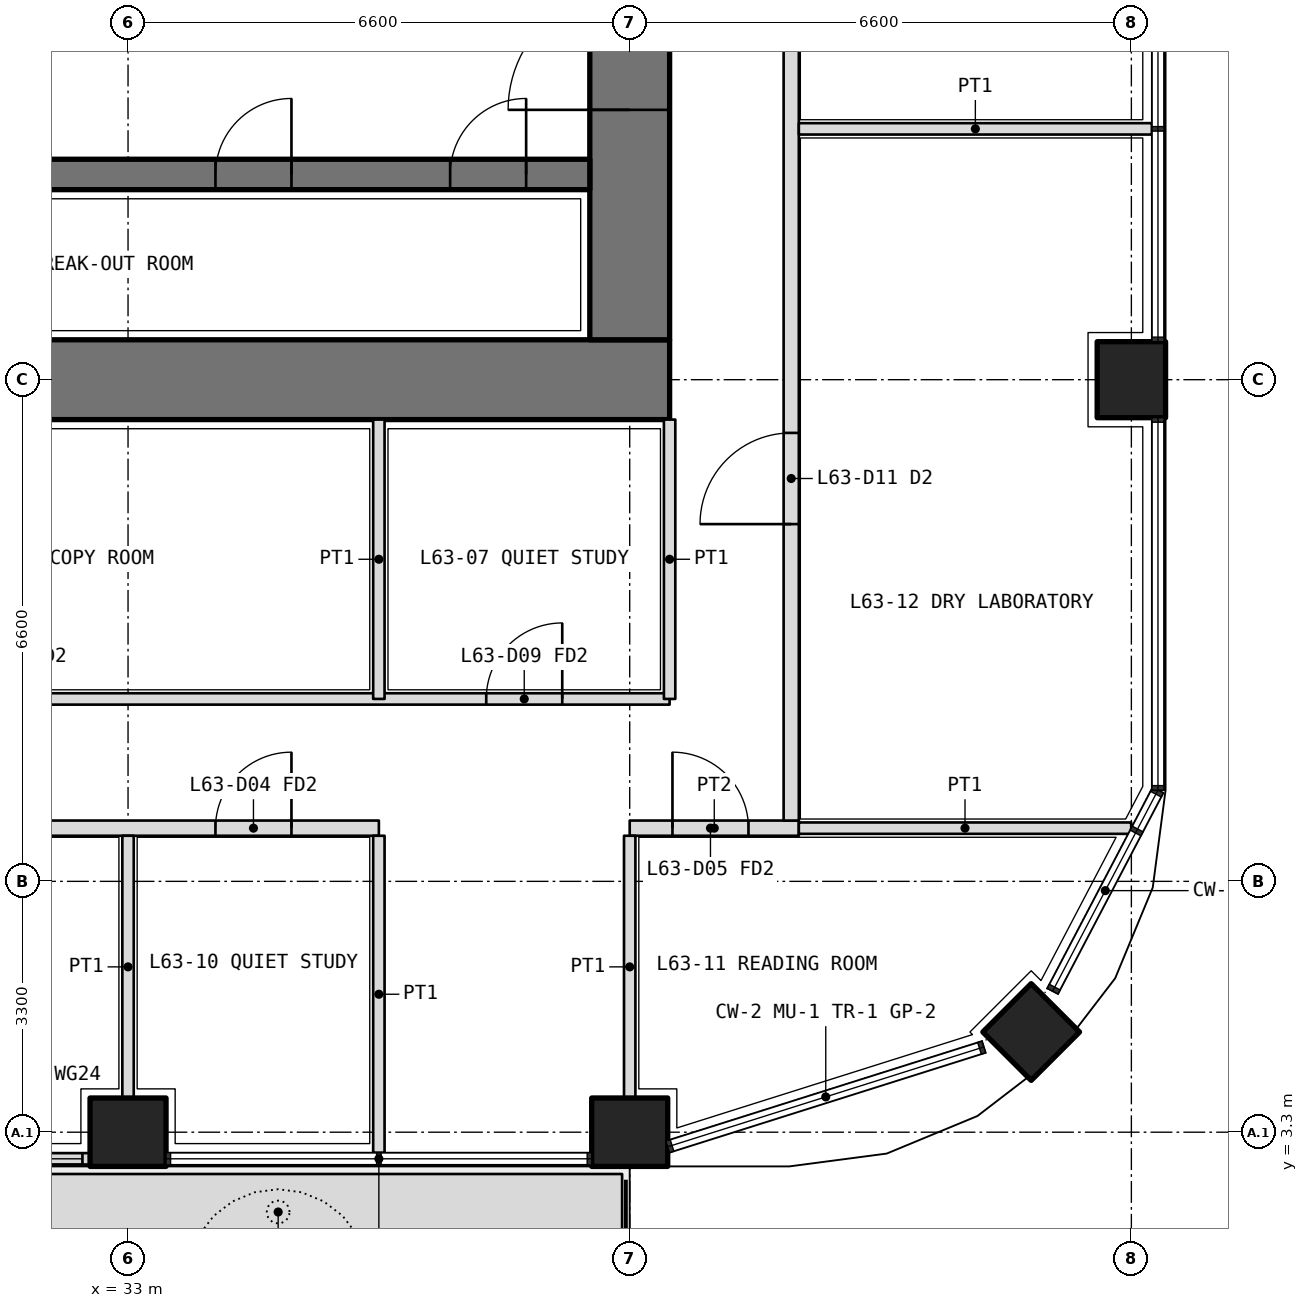
"""IFC4 building model, lengths in metres.
Left out: names, types, materials, properties, quantities, classifications, styles, units other than length and angle.
Written with IfcOpenShell. Run it as: python <this file> out.ifc"""

import sys

from ifc_helpers import new_model, si_unit, direction, frame, frame_2d, origin, origin_2d, place, context, subcontext, project, spatial, polyline, rectangle, outline, extrude, element, fill, save


model = new_model("IFC4")
c1 = context("Model", 3, precision=1e-05, world=origin(), true_north=direction((0.0, 1.0)))
c2 = subcontext(c1, "Body", "Model", "MODEL_VIEW")
j1 = project(units=[si_unit("LENGTHUNIT", "METRE"), si_unit("PLANEANGLEUNIT", "RADIAN")], contexts=[c1])
p1 = place(None, origin())
s1 = spatial("IfcSite", under=j1, at=p1, CompositionType="ELEMENT")
p2 = place(p1, origin())
s2 = spatial("IfcBuilding", under=s1, at=p2, CompositionType="ELEMENT")
p3 = place(p2, frame((0.0, 0.0, 275.4)))
s3 = spatial("IfcBuildingStorey", under=s2, at=p3, CompositionType="ELEMENT", Elevation=275.4)
p4 = place(p3, frame((44.882, 4.618, 0.0), z_axis=(0.0, 0.0, 1.0), x_axis=(0.707106781187, 0.707106781187, 0.0)))
e1 = element("IfcColumn", 1, at=p4, inside=s3, PredefinedType="COLUMN", context=c2, shape_type="SweptSolid", body=[
    extrude(rectangle(XDim=0.9, YDim=0.9, at=origin_2d()), origin(), (0.0, 0.0, 1.0), 4.2),
])
for number, where, z_axis, x_axis in (
    (2, (33.0, 3.3, 0.0), (0.0, 0.0, 1.0), (1.0, 0.0, 0.0)),
    (3, (39.6, 3.3, 0.0), (0.0, 0.0, 1.0), (1.0, 0.0, 0.0)),
    (4, (46.2, 13.2, 0.0), (0.0, 0.0, 1.0), (0.0, 1.0, 0.0)),
):
    element("IfcColumn", number, at=place(p3, frame(where, z_axis=z_axis, x_axis=x_axis)), inside=s3, PredefinedType="COLUMN", context=c2, shape_type="SweptSolid", body=[
        extrude(rectangle(XDim=1.0, YDim=0.9, at=origin_2d()), origin(), (0.0, 0.0, 1.0), 4.2),
    ])
p5 = place(p3, origin())
e5 = element("IfcWall", 5, at=p5, inside=s3, PredefinedType="USERDEFINED", context=c2, shape_type="SweptSolid", body=[
    extrude(outline(polyline([(30.45, 1.75), (39.5, 1.75), (39.5, 2.75), (30.45, 2.75), (30.45, 1.75)]), holes=[polyline([(30.6, 1.9), (39.35, 1.9), (39.35, 2.6), (30.6, 2.6), (30.6, 1.9)])]), origin(), (0.0, 0.0, 1.0), 1.05),
])
p6 = place(p3, frame((26.9, 2.95, 0.0), z_axis=(0.0, 0.0, 1.0), x_axis=(1.0, 0.0, 0.0)))
e6 = element("IfcWall", 6, at=p6, inside=s3, PredefinedType="SOLIDWALL", context=c2, shape_type="SweptSolid", body=[
    extrude(rectangle(XDim=5.6, YDim=0.15, at=frame_2d((2.8, 0.0))), origin(), (0.0, 0.0, 1.0), 2.7),
])
p7 = place(p6, frame((3.05, 0.0, 0.0)))
e7 = element("IfcOpeningElement", 7, at=p7, cuts=e6, PredefinedType="OPENING", context=c2, shape_type="SweptSolid", body=[
    extrude(rectangle(XDim=1.0, YDim=2.4, at=frame_2d((0.5, 1.2))), frame((0.0, 0.085, 0.0), z_axis=(0.0, -1.0, 0.0), x_axis=(1.0, 0.0, 0.0)), (0.0, 0.0, 1.0), 0.17),
])
p8 = place(p6, frame((0.1, 0.0, 0.1)))
e8 = element("IfcOpeningElement", 8, at=p8, cuts=e6, PredefinedType="OPENING", context=c2, shape_type="SweptSolid", body=[
    extrude(rectangle(XDim=2.45, YDim=2.3, at=frame_2d((1.225, 1.15))), frame((0.0, 0.085, 0.0), z_axis=(0.0, -1.0, 0.0), x_axis=(1.0, 0.0, 0.0)), (0.0, 0.0, 1.0), 0.17),
])
p9 = place(p6, frame((4.15, 0.0, 0.1)))
e9 = element("IfcOpeningElement", 9, at=p9, cuts=e6, PredefinedType="OPENING", context=c2, shape_type="SweptSolid", body=[
    extrude(rectangle(XDim=1.35, YDim=2.3, at=frame_2d((0.675, 1.15))), frame((0.0, 0.085, 0.0), z_axis=(0.0, -1.0, 0.0), x_axis=(1.0, 0.0, 0.0)), (0.0, 0.0, 1.0), 0.17),
])
p10 = place(p3, frame((12.675, 13.2, 0.0), z_axis=(0.0, 0.0, 1.0), x_axis=(1.0, 0.0, 0.0)))
e10 = element("IfcWall", 10, at=p10, inside=s3, PredefinedType="SHEAR", context=c2, shape_type="SweptSolid", body=[
    extrude(rectangle(XDim=27.45, YDim=1.05, at=frame_2d((13.725, 0.0))), origin(), (0.0, 0.0, 1.0), 4.2),
])
p11 = place(p3, frame((39.6, 13.725, 0.0), z_axis=(0.0, 0.0, 1.0), x_axis=(0.0, 1.0, 0.0)))
e11 = element("IfcWall", 11, at=p11, inside=s3, PredefinedType="SHEAR", context=c2, shape_type="SweptSolid", body=[
    extrude(rectangle(XDim=18.75, YDim=1.05, at=frame_2d((9.375, 0.0))), origin(), (0.0, 0.0, 1.0), 4.2),
])
p12 = place(p11, frame((3.025, 0.0, 0.0)))
e12 = element("IfcOpeningElement", 12, at=p12, cuts=e11, PredefinedType="OPENING", context=c2, shape_type="SweptSolid", body=[
    extrude(rectangle(XDim=1.6, YDim=2.1, at=frame_2d((0.8, 1.05))), frame((0.0, 0.535, 0.0), z_axis=(0.0, -1.0, 0.0), x_axis=(1.0, 0.0, 0.0)), (0.0, 0.0, 1.0), 1.07),
])
p13 = place(p11, frame((13.825, 0.0, 0.0)))
e13 = element("IfcOpeningElement", 13, at=p13, cuts=e11, PredefinedType="OPENING", context=c2, shape_type="SweptSolid", body=[
    extrude(rectangle(XDim=1.6, YDim=2.1, at=frame_2d((0.8, 1.05))), frame((0.0, 0.535, 0.0), z_axis=(0.0, -1.0, 0.0), x_axis=(1.0, 0.0, 0.0)), (0.0, 0.0, 1.0), 1.07),
])
p14 = place(p3, frame((13.725, 15.9, 0.0), z_axis=(0.0, 0.0, 1.0), x_axis=(1.0, 0.0, 0.0)))
e14 = element("IfcWall", 14, at=p14, inside=s3, PredefinedType="SHEAR", context=c2, shape_type="SweptSolid", body=[
    extrude(rectangle(XDim=25.35, YDim=0.4, at=frame_2d((12.675, 0.0))), origin(), (0.0, 0.0, 1.0), 4.2),
])
p15 = place(p14, frame((0.837, 0.0, 0.0)))
e15 = element("IfcOpeningElement", 15, at=p15, cuts=e14, PredefinedType="OPENING", context=c2, shape_type="SweptSolid", body=[
    extrude(rectangle(XDim=1.0, YDim=2.1, at=frame_2d((0.5, 1.05))), frame((0.0, 0.21, 0.0), z_axis=(0.0, -1.0, 0.0), x_axis=(1.0, 0.0, 0.0)), (0.0, 0.0, 1.0), 0.42),
])
p16 = place(p14, frame((3.925, 0.0, 0.0)))
e16 = element("IfcOpeningElement", 16, at=p16, cuts=e14, PredefinedType="OPENING", context=c2, shape_type="SweptSolid", body=[
    extrude(rectangle(XDim=1.0, YDim=2.1, at=frame_2d((0.5, 1.05))), frame((0.0, 0.21, 0.0), z_axis=(0.0, -1.0, 0.0), x_axis=(1.0, 0.0, 0.0)), (0.0, 0.0, 1.0), 0.42),
])
p17 = place(p14, frame((7.225, 0.0, 0.0)))
e17 = element("IfcOpeningElement", 17, at=p17, cuts=e14, PredefinedType="OPENING", context=c2, shape_type="SweptSolid", body=[
    extrude(rectangle(XDim=1.0, YDim=2.1, at=frame_2d((0.5, 1.05))), frame((0.0, 0.21, 0.0), z_axis=(0.0, -1.0, 0.0), x_axis=(1.0, 0.0, 0.0)), (0.0, 0.0, 1.0), 0.42),
])
p18 = place(p14, frame((10.525, 0.0, 0.0)))
e18 = element("IfcOpeningElement", 18, at=p18, cuts=e14, PredefinedType="OPENING", context=c2, shape_type="SweptSolid", body=[
    extrude(rectangle(XDim=1.0, YDim=2.1, at=frame_2d((0.5, 1.05))), frame((0.0, 0.21, 0.0), z_axis=(0.0, -1.0, 0.0), x_axis=(1.0, 0.0, 0.0)), (0.0, 0.0, 1.0), 0.42),
])
p19 = place(p14, frame((13.825, 0.0, 0.0)))
e19 = element("IfcOpeningElement", 19, at=p19, cuts=e14, PredefinedType="OPENING", context=c2, shape_type="SweptSolid", body=[
    extrude(rectangle(XDim=1.0, YDim=2.1, at=frame_2d((0.5, 1.05))), frame((0.0, 0.21, 0.0), z_axis=(0.0, -1.0, 0.0), x_axis=(1.0, 0.0, 0.0)), (0.0, 0.0, 1.0), 0.42),
])
p20 = place(p14, frame((17.125, 0.0, 0.0)))
e20 = element("IfcOpeningElement", 20, at=p20, cuts=e14, PredefinedType="OPENING", context=c2, shape_type="SweptSolid", body=[
    extrude(rectangle(XDim=1.0, YDim=2.1, at=frame_2d((0.5, 1.05))), frame((0.0, 0.21, 0.0), z_axis=(0.0, -1.0, 0.0), x_axis=(1.0, 0.0, 0.0)), (0.0, 0.0, 1.0), 0.42),
])
p21 = place(p14, frame((20.425, 0.0, 0.0)))
e21 = element("IfcOpeningElement", 21, at=p21, cuts=e14, PredefinedType="OPENING", context=c2, shape_type="SweptSolid", body=[
    extrude(rectangle(XDim=1.0, YDim=2.1, at=frame_2d((0.5, 1.05))), frame((0.0, 0.21, 0.0), z_axis=(0.0, -1.0, 0.0), x_axis=(1.0, 0.0, 0.0)), (0.0, 0.0, 1.0), 0.42),
])
p22 = place(p14, frame((23.512, 0.0, 0.0)))
e22 = element("IfcOpeningElement", 22, at=p22, cuts=e14, PredefinedType="OPENING", context=c2, shape_type="SweptSolid", body=[
    extrude(rectangle(XDim=1.0, YDim=2.1, at=frame_2d((0.5, 1.05))), frame((0.0, 0.21, 0.0), z_axis=(0.0, -1.0, 0.0), x_axis=(1.0, 0.0, 0.0)), (0.0, 0.0, 1.0), 0.42),
])
p23 = place(p3, frame((12.675, 9.0, 0.0), z_axis=(0.0, 0.0, 1.0), x_axis=(1.0, 0.0, 0.0)))
e23 = element("IfcWall", 23, at=p23, inside=s3, PredefinedType="PARTITIONING", context=c2, shape_type="SweptSolid", body=[
    extrude(rectangle(XDim=27.45, YDim=0.15, at=frame_2d((13.725, 0.0))), origin(), (0.0, 0.0, 1.0), 3.0),
])
p24 = place(p23, frame((4.712, 0.0, 0.0)))
e24 = element("IfcOpeningElement", 24, at=p24, cuts=e23, PredefinedType="OPENING", context=c2, shape_type="SweptSolid", body=[
    extrude(rectangle(XDim=1.0, YDim=2.1, at=frame_2d((0.5, 1.05))), frame((0.0, 0.085, 0.0), z_axis=(0.0, -1.0, 0.0), x_axis=(1.0, 0.0, 0.0)), (0.0, 0.0, 1.0), 0.17),
])
p25 = place(p23, frame((11.575, 0.0, 0.0)))
e25 = element("IfcOpeningElement", 25, at=p25, cuts=e23, PredefinedType="OPENING", context=c2, shape_type="SweptSolid", body=[
    extrude(rectangle(XDim=1.0, YDim=2.1, at=frame_2d((0.5, 1.05))), frame((0.0, 0.085, 0.0), z_axis=(0.0, -1.0, 0.0), x_axis=(1.0, 0.0, 0.0)), (0.0, 0.0, 1.0), 0.17),
])
p26 = place(p23, frame((18.175, 0.0, 0.0)))
e26 = element("IfcOpeningElement", 26, at=p26, cuts=e23, PredefinedType="OPENING", context=c2, shape_type="SweptSolid", body=[
    extrude(rectangle(XDim=1.0, YDim=2.1, at=frame_2d((0.5, 1.05))), frame((0.0, 0.085, 0.0), z_axis=(0.0, -1.0, 0.0), x_axis=(1.0, 0.0, 0.0)), (0.0, 0.0, 1.0), 0.17),
])
p27 = place(p23, frame((25.038, 0.0, 0.0)))
e27 = element("IfcOpeningElement", 27, at=p27, cuts=e23, PredefinedType="OPENING", context=c2, shape_type="SweptSolid", body=[
    extrude(rectangle(XDim=1.0, YDim=2.1, at=frame_2d((0.5, 1.05))), frame((0.0, 0.085, 0.0), z_axis=(0.0, -1.0, 0.0), x_axis=(1.0, 0.0, 0.0)), (0.0, 0.0, 1.0), 0.17),
])
p28 = place(p3, frame((40.125, 12.675, 0.0), z_axis=(0.0, 0.0, 1.0), x_axis=(0.0, -1.0, 0.0)))
e28 = element("IfcWall", 28, at=p28, inside=s3, PredefinedType="PARTITIONING", context=c2, shape_type="SweptSolid", body=[
    extrude(rectangle(XDim=3.675, YDim=0.15, at=frame_2d((1.837, 0.0))), origin(), (0.0, 0.0, 1.0), 3.0),
])
p29 = place(p3, frame((36.3, 12.675, 0.0), z_axis=(0.0, 0.0, 1.0), x_axis=(0.0, -1.0, 0.0)))
e29 = element("IfcWall", 29, at=p29, inside=s3, PredefinedType="PARTITIONING", context=c2, shape_type="SweptSolid", body=[
    extrude(rectangle(XDim=3.675, YDim=0.15, at=frame_2d((1.837, 0.0))), origin(), (0.0, 0.0, 1.0), 3.9),
])
p30 = place(p3, frame((10.975, 7.3, 0.0), z_axis=(0.0, 0.0, 1.0), x_axis=(1.0, 0.0, 0.0)))
e30 = element("IfcWall", 30, at=p30, inside=s3, PredefinedType="PARTITIONING", context=c2, shape_type="SweptSolid", body=[
    extrude(rectangle(XDim=25.325, YDim=0.2, at=frame_2d((12.663, 0.0))), origin(), (0.0, 0.0, 1.0), 3.0),
])
p31 = place(p30, frame((0.562, 0.0, 0.0)))
e31 = element("IfcOpeningElement", 31, at=p31, cuts=e30, PredefinedType="OPENING", context=c2, shape_type="SweptSolid", body=[
    extrude(rectangle(XDim=1.2, YDim=2.1, at=frame_2d((0.6, 1.05))), frame((0.0, 0.11, 0.0), z_axis=(0.0, -1.0, 0.0), x_axis=(1.0, 0.0, 0.0)), (0.0, 0.0, 1.0), 0.22),
])
p32 = place(p30, frame((11.625, 0.0, 0.0)))
e32 = element("IfcOpeningElement", 32, at=p32, cuts=e30, PredefinedType="OPENING", context=c2, shape_type="SweptSolid", body=[
    extrude(rectangle(XDim=1.0, YDim=2.1, at=frame_2d((0.5, 1.05))), frame((0.0, 0.11, 0.0), z_axis=(0.0, -1.0, 0.0), x_axis=(1.0, 0.0, 0.0)), (0.0, 0.0, 1.0), 0.22),
])
p33 = place(p30, frame((23.175, 0.0, 0.0)))
e33 = element("IfcOpeningElement", 33, at=p33, cuts=e30, PredefinedType="OPENING", context=c2, shape_type="SweptSolid", body=[
    extrude(rectangle(XDim=1.0, YDim=2.1, at=frame_2d((0.5, 1.05))), frame((0.0, 0.11, 0.0), z_axis=(0.0, -1.0, 0.0), x_axis=(1.0, 0.0, 0.0)), (0.0, 0.0, 1.0), 0.22),
])
p34 = place(p3, frame((39.6, 7.3, 0.0), z_axis=(0.0, 0.0, 1.0), x_axis=(1.0, 0.0, 0.0)))
e34 = element("IfcWall", 34, at=p34, inside=s3, PredefinedType="PARTITIONING", context=c2, shape_type="SweptSolid", body=[
    extrude(rectangle(XDim=2.225, YDim=0.2, at=frame_2d((1.112, 0.0))), origin(), (0.0, 0.0, 1.0), 3.0),
])
p35 = place(p34, frame((0.562, 0.0, 0.0)))
e35 = element("IfcOpeningElement", 35, at=p35, cuts=e34, PredefinedType="OPENING", context=c2, shape_type="SweptSolid", body=[
    extrude(rectangle(XDim=1.0, YDim=2.1, at=frame_2d((0.5, 1.05))), frame((0.0, 0.11, 0.0), z_axis=(0.0, -1.0, 0.0), x_axis=(1.0, 0.0, 0.0)), (0.0, 0.0, 1.0), 0.22),
])
p36 = place(p3, frame((41.725, 7.4, 0.0), z_axis=(0.0, 0.0, 1.0), x_axis=(0.0, 1.0, 0.0)))
e36 = element("IfcWall", 36, at=p36, inside=s3, PredefinedType="PARTITIONING", context=c2, shape_type="SweptSolid", body=[
    extrude(rectangle(XDim=31.4, YDim=0.2, at=frame_2d((15.7, 0.0))), origin(), (0.0, 0.0, 1.0), 3.0),
])
p37 = place(p36, frame((3.9, 0.0, 0.0)))
e37 = element("IfcOpeningElement", 37, at=p37, cuts=e36, PredefinedType="OPENING", context=c2, shape_type="SweptSolid", body=[
    extrude(rectangle(XDim=1.2, YDim=2.1, at=frame_2d((0.6, 1.05))), frame((0.0, 0.11, 0.0), z_axis=(0.0, -1.0, 0.0), x_axis=(1.0, 0.0, 0.0)), (0.0, 0.0, 1.0), 0.22),
])
p38 = place(p36, frame((10.25, 0.0, 0.0)))
e38 = element("IfcOpeningElement", 38, at=p38, cuts=e36, PredefinedType="OPENING", context=c2, shape_type="SweptSolid", body=[
    extrude(rectangle(XDim=1.0, YDim=2.1, at=frame_2d((0.5, 1.05))), frame((0.0, 0.11, 0.0), z_axis=(0.0, -1.0, 0.0), x_axis=(1.0, 0.0, 0.0)), (0.0, 0.0, 1.0), 0.22),
])
p39 = place(p36, frame((13.4, 0.0, 0.0)))
e39 = element("IfcOpeningElement", 39, at=p39, cuts=e36, PredefinedType="OPENING", context=c2, shape_type="SweptSolid", body=[
    extrude(rectangle(XDim=1.0, YDim=2.1, at=frame_2d((0.5, 1.05))), frame((0.0, 0.11, 0.0), z_axis=(0.0, -1.0, 0.0), x_axis=(1.0, 0.0, 0.0)), (0.0, 0.0, 1.0), 0.22),
])
p40 = place(p36, frame((16.75, 0.0, 0.0)))
e40 = element("IfcOpeningElement", 40, at=p40, cuts=e36, PredefinedType="OPENING", context=c2, shape_type="SweptSolid", body=[
    extrude(rectangle(XDim=0.9, YDim=2.1, at=frame_2d((0.45, 1.05))), frame((0.0, 0.11, 0.0), z_axis=(0.0, -1.0, 0.0), x_axis=(1.0, 0.0, 0.0)), (0.0, 0.0, 1.0), 0.22),
])
p41 = place(p36, frame((20.15, 0.0, 0.0)))
e41 = element("IfcOpeningElement", 41, at=p41, cuts=e36, PredefinedType="OPENING", context=c2, shape_type="SweptSolid", body=[
    extrude(rectangle(XDim=1.0, YDim=2.1, at=frame_2d((0.5, 1.05))), frame((0.0, 0.11, 0.0), z_axis=(0.0, -1.0, 0.0), x_axis=(1.0, 0.0, 0.0)), (0.0, 0.0, 1.0), 0.22),
])
p42 = place(p36, frame((23.45, 0.0, 0.0)))
e42 = element("IfcOpeningElement", 42, at=p42, cuts=e36, PredefinedType="OPENING", context=c2, shape_type="SweptSolid", body=[
    extrude(rectangle(XDim=1.0, YDim=2.1, at=frame_2d((0.5, 1.05))), frame((0.0, 0.11, 0.0), z_axis=(0.0, -1.0, 0.0), x_axis=(1.0, 0.0, 0.0)), (0.0, 0.0, 1.0), 0.22),
])
p43 = place(p36, frame((28.05, 0.0, 0.0)))
e43 = element("IfcOpeningElement", 43, at=p43, cuts=e36, PredefinedType="OPENING", context=c2, shape_type="SweptSolid", body=[
    extrude(rectangle(XDim=1.0, YDim=2.1, at=frame_2d((0.5, 1.05))), frame((0.0, 0.11, 0.0), z_axis=(0.0, -1.0, 0.0), x_axis=(1.0, 0.0, 0.0)), (0.0, 0.0, 1.0), 0.22),
])
p44 = place(p3, frame((46.198, 7.3, 0.0), z_axis=(0.0, 0.0, 1.0), x_axis=(-1.0, 0.0, 0.0)))
e44 = element("IfcWall", 44, at=p44, inside=s3, PredefinedType="PARTITIONING", context=c2, shape_type="SweptSolid", body=[
    extrude(rectangle(XDim=4.373, YDim=0.15, at=frame_2d((2.186, 0.0))), origin(), (0.0, 0.0, 1.0), 2.7),
])
p45 = place(p3, frame((33.0, 3.75, 0.0), z_axis=(0.0, 0.0, 1.0), x_axis=(0.0, 1.0, 0.0)))
e45 = element("IfcWall", 45, at=p45, inside=s3, PredefinedType="PARTITIONING", context=c2, shape_type="SweptSolid", body=[
    extrude(rectangle(XDim=3.45, YDim=0.15, at=frame_2d((1.725, 0.0))), origin(), (0.0, 0.0, 1.0), 3.0),
])
p46 = place(p3, frame((36.3, 3.03, 0.0), z_axis=(0.0, 0.0, 1.0), x_axis=(0.0, 1.0, 0.0)))
e46 = element("IfcWall", 46, at=p46, inside=s3, PredefinedType="PARTITIONING", context=c2, shape_type="SweptSolid", body=[
    extrude(rectangle(XDim=4.17, YDim=0.15, at=frame_2d((2.085, 0.0))), origin(), (0.0, 0.0, 1.0), 2.7),
])
p47 = place(p3, frame((39.6, 3.75, 0.0), z_axis=(0.0, 0.0, 1.0), x_axis=(0.0, 1.0, 0.0)))
e47 = element("IfcWall", 47, at=p47, inside=s3, PredefinedType="PARTITIONING", context=c2, shape_type="SweptSolid", body=[
    extrude(rectangle(XDim=3.45, YDim=0.15, at=frame_2d((1.725, 0.0))), origin(), (0.0, 0.0, 1.0), 3.0),
])
p48 = place(p3, frame((46.47, 16.5, 0.0), z_axis=(0.0, 0.0, 1.0), x_axis=(-1.0, 0.0, 0.0)))
e48 = element("IfcWall", 48, at=p48, inside=s3, PredefinedType="PARTITIONING", context=c2, shape_type="SweptSolid", body=[
    extrude(rectangle(XDim=4.645, YDim=0.15, at=frame_2d((2.323, 0.0))), origin(), (0.0, 0.0, 1.0), 2.7),
])
p49 = place(p9, origin())
e49 = element("IfcWindow", 49, at=p49, inside=s3, PartitioningType="SINGLE_PANEL", PredefinedType="WINDOW", context=c2, shape_type="SweptSolid", body=[
    extrude(rectangle(XDim=1.35, YDim=2.3, at=frame_2d((0.675, 1.15))), frame((0.0, 0.03, 0.0), z_axis=(0.0, -1.0, 0.0), x_axis=(1.0, 0.0, 0.0)), (0.0, 0.0, 1.0), 0.06),
])
fill(e9, e49)
p50 = place(p27, origin())
e50 = element("IfcDoor", 50, at=p50, inside=s3, OperationType="SINGLE_SWING_RIGHT", PredefinedType="DOOR", context=c2, shape_type="SweptSolid", body=[
    extrude(rectangle(XDim=1.0, YDim=2.1, at=frame_2d((0.5, 1.05))), frame((0.0, 0.025, 0.0), z_axis=(0.0, -1.0, 0.0), x_axis=(1.0, 0.0, 0.0)), (0.0, 0.0, 1.0), 0.05),
])
fill(e27, e50)
p51 = place(p33, origin())
e51 = element("IfcDoor", 51, at=p51, inside=s3, OperationType="SINGLE_SWING_RIGHT", PredefinedType="DOOR", context=c2, shape_type="SweptSolid", body=[
    extrude(rectangle(XDim=1.0, YDim=2.1, at=frame_2d((0.5, 1.05))), frame((0.0, 0.025, 0.0), z_axis=(0.0, -1.0, 0.0), x_axis=(1.0, 0.0, 0.0)), (0.0, 0.0, 1.0), 0.05),
])
fill(e33, e51)
p52 = place(p35, origin())
e52 = element("IfcDoor", 52, at=p52, inside=s3, OperationType="SINGLE_SWING_LEFT", PredefinedType="DOOR", context=c2, shape_type="SweptSolid", body=[
    extrude(rectangle(XDim=1.0, YDim=2.1, at=frame_2d((0.5, 1.05))), frame((0.0, 0.025, 0.0), z_axis=(0.0, -1.0, 0.0), x_axis=(1.0, 0.0, 0.0)), (0.0, 0.0, 1.0), 0.05),
])
fill(e35, e52)
p53 = place(p37, origin())
e53 = element("IfcDoor", 53, at=p53, inside=s3, OperationType="DOUBLE_DOOR_SINGLE_SWING", PredefinedType="DOOR", context=c2, shape_type="SweptSolid", body=[
    extrude(rectangle(XDim=1.2, YDim=2.1, at=frame_2d((0.6, 1.05))), frame((0.0, 0.025, 0.0), z_axis=(0.0, -1.0, 0.0), x_axis=(1.0, 0.0, 0.0)), (0.0, 0.0, 1.0), 0.05),
])
fill(e37, e53)
p54 = place(p21, origin())
e54 = element("IfcDoor", 54, at=p54, inside=s3, OperationType="SINGLE_SWING_RIGHT", PredefinedType="DOOR", context=c2, shape_type="SweptSolid", body=[
    extrude(rectangle(XDim=1.0, YDim=2.1, at=frame_2d((0.5, 1.05))), frame((0.0, 0.025, 0.0), z_axis=(0.0, -1.0, 0.0), x_axis=(1.0, 0.0, 0.0)), (0.0, 0.0, 1.0), 0.05),
])
fill(e21, e54)
p55 = place(p22, origin())
e55 = element("IfcDoor", 55, at=p55, inside=s3, OperationType="SINGLE_SWING_RIGHT", PredefinedType="DOOR", context=c2, shape_type="SweptSolid", body=[
    extrude(rectangle(XDim=1.0, YDim=2.1, at=frame_2d((0.5, 1.05))), frame((0.0, 0.025, 0.0), z_axis=(0.0, -1.0, 0.0), x_axis=(1.0, 0.0, 0.0)), (0.0, 0.0, 1.0), 0.05),
])
fill(e22, e55)
p56 = place(p12, origin())
e56 = element("IfcDoor", 56, at=p56, inside=s3, OperationType="DOUBLE_DOOR_DOUBLE_SWING", PredefinedType="DOOR", context=c2, shape_type="SweptSolid", body=[
    extrude(rectangle(XDim=1.6, YDim=2.1, at=frame_2d((0.8, 1.05))), frame((0.0, 0.025, 0.0), z_axis=(0.0, -1.0, 0.0), x_axis=(1.0, 0.0, 0.0)), (0.0, 0.0, 1.0), 0.05),
])
fill(e12, e56)
save(model, sys.argv[1])
